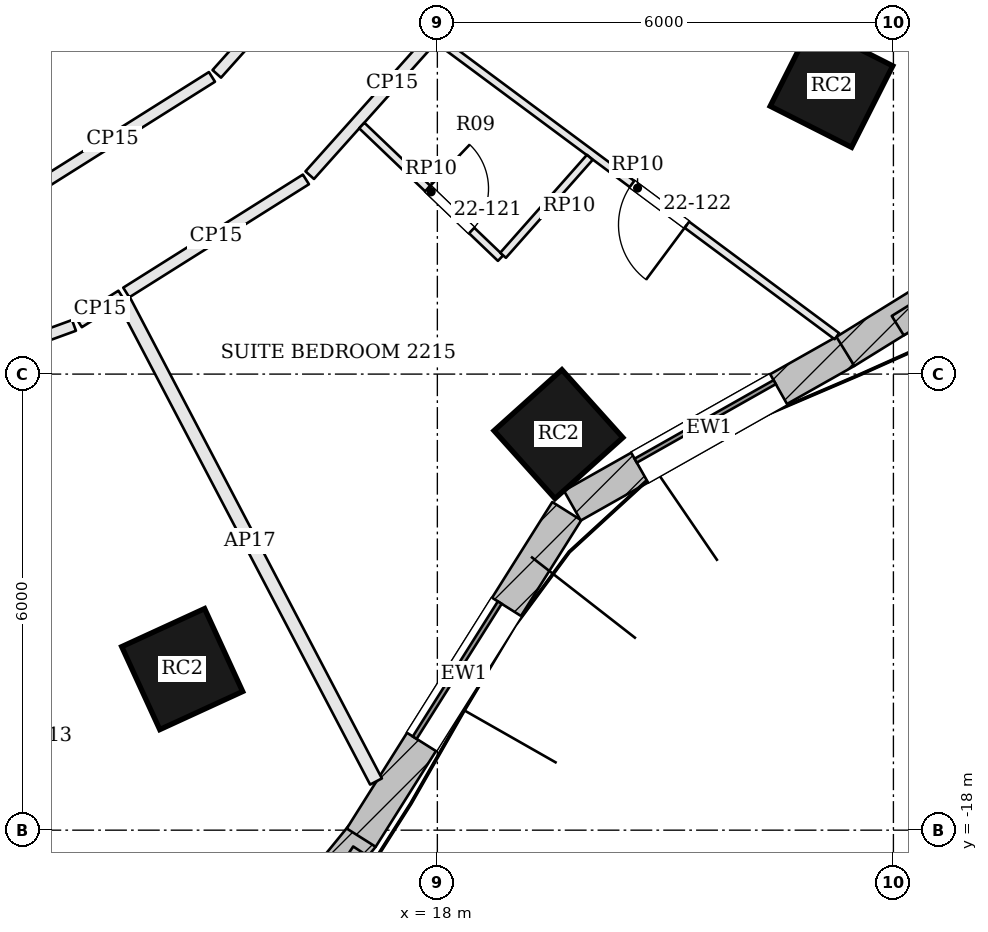
"""IFC4 building model, lengths in metres.
Left out: names, types, materials, properties, quantities, classifications, styles, units other than length and angle.
Written with IfcOpenShell. Run it as: python <this file> out.ifc"""

import sys

from ifc_helpers import new_model, si_unit, direction, frame, frame_2d, origin, origin_2d, place, context, subcontext, project, spatial, rectangle, extrude, element, fill, save


model = new_model("IFC4")
c1 = context("Model", 3, precision=1e-05, world=origin(), true_north=direction((0.0, 1.0)))
c2 = subcontext(c1, "Body", "Model", "MODEL_VIEW")
j1 = project(units=[si_unit("LENGTHUNIT", "METRE"), si_unit("PLANEANGLEUNIT", "RADIAN")], contexts=[c1])
p1 = place(None, origin())
s1 = spatial("IfcSite", under=j1, at=p1, CompositionType="ELEMENT")
p2 = place(p1, origin())
s2 = spatial("IfcBuilding", under=s1, at=p2, CompositionType="ELEMENT")
p3 = place(p2, frame((0.0, 0.0, 96.0)))
s3 = spatial("IfcBuildingStorey", under=s2, at=p3, CompositionType="ELEMENT", Elevation=96.0)
for number, where, z_axis, x_axis in (
    (1, (14.643, -15.881, 0.0), (0.0, 0.0, 1.0), (0.909, 0.417, 0.0)),
    (2, (19.593, -12.79, 0.0), (0.0, 0.0, 1.0), (0.744, 0.668, 0.0)),
    (3, (23.185, -8.21, 0.0), (0.0, 0.0, 1.0), (0.451, 0.893, 0.0)),
):
    element("IfcColumn", number, at=place(p3, frame(where, z_axis=z_axis, x_axis=x_axis)), inside=s3, PredefinedType="COLUMN", context=c2, shape_type="SweptSolid", body=[
        extrude(rectangle(XDim=1.2, YDim=1.2, at=origin_2d()), origin(), (0.0, 0.0, 1.0), 3.6),
    ])
p4 = place(p3, frame((14.926, -20.641, 0.0), z_axis=(0.0, 0.0, 1.0), x_axis=(0.631548074669, 0.775336720001, 0.0)))
e4 = element("IfcWall", 4, at=p4, inside=s3, PredefinedType="SOLIDWALL", context=c2, shape_type="SweptSolid", body=[
    extrude(rectangle(XDim=3.308, YDim=0.45, at=frame_2d((1.654, 0.0))), origin(), (0.0, 0.0, 1.0), 3.4),
])
p5 = place(p4, frame((0.604, 0.0, 0.9)))
e5 = element("IfcOpeningElement", 5, at=p5, cuts=e4, PredefinedType="OPENING", context=c2, shape_type="SweptSolid", body=[
    extrude(rectangle(XDim=2.1, YDim=2.0, at=frame_2d((1.05, 1.0))), frame((0.0, 0.235, 0.0), z_axis=(0.0, -1.0, 0.0), x_axis=(1.0, 0.0, 0.0)), (0.0, 0.0, 1.0), 0.47),
])
p6 = place(p3, frame((16.998, -18.099, 0.0), z_axis=(0.0, 0.0, 1.0), x_axis=(0.532745661304, 0.846275404559, 0.0)))
e6 = element("IfcWall", 6, at=p6, inside=s3, PredefinedType="SOLIDWALL", context=c2, shape_type="SweptSolid", body=[
    extrude(rectangle(XDim=5.076, YDim=0.45, at=frame_2d((2.538, 0.0))), origin(), (0.0, 0.0, 1.0), 3.4),
])
p7 = place(p6, frame((1.488, 0.0, 0.9)))
e7 = element("IfcOpeningElement", 7, at=p7, cuts=e6, PredefinedType="OPENING", context=c2, shape_type="SweptSolid", body=[
    extrude(rectangle(XDim=2.1, YDim=2.0, at=frame_2d((1.05, 1.0))), frame((0.0, 0.235, 0.0), z_axis=(0.0, -1.0, 0.0), x_axis=(1.0, 0.0, 0.0)), (0.0, 0.0, 1.0), 0.47),
])
p8 = place(p3, frame((19.776, -13.731, 0.0), z_axis=(0.0, 0.0, 1.0), x_axis=(0.870610133829, 0.491973571318, 0.0)))
e8 = element("IfcWall", 8, at=p8, inside=s3, PredefinedType="SOLIDWALL", context=c2, shape_type="SweptSolid", body=[
    extrude(rectangle(XDim=4.134, YDim=0.45, at=frame_2d((2.067, 0.0))), origin(), (0.0, 0.0, 1.0), 3.4),
])
p9 = place(p8, frame((1.017, 0.0, 0.9)))
e9 = element("IfcOpeningElement", 9, at=p9, cuts=e8, PredefinedType="OPENING", context=c2, shape_type="SweptSolid", body=[
    extrude(rectangle(XDim=2.1, YDim=2.0, at=frame_2d((1.05, 1.0))), frame((0.0, 0.235, 0.0), z_axis=(0.0, -1.0, 0.0), x_axis=(1.0, 0.0, 0.0)), (0.0, 0.0, 1.0), 0.47),
])
p10 = place(p3, frame((23.368, -11.701, 0.0), z_axis=(0.0, 0.0, 1.0), x_axis=(0.850251408633, 0.526376806211, 0.0)))
e10 = element("IfcWall", 10, at=p10, inside=s3, PredefinedType="SOLIDWALL", context=c2, shape_type="SweptSolid", body=[
    extrude(rectangle(XDim=5.302, YDim=0.45, at=frame_2d((2.651, 0.0))), origin(), (0.0, 0.0, 1.0), 3.4),
])
p11 = place(p10, frame((1.601, 0.0, 0.9)))
e11 = element("IfcOpeningElement", 11, at=p11, cuts=e10, PredefinedType="OPENING", context=c2, shape_type="SweptSolid", body=[
    extrude(rectangle(XDim=2.1, YDim=2.0, at=frame_2d((1.05, 1.0))), frame((0.0, 0.235, 0.0), z_axis=(0.0, -1.0, 0.0), x_axis=(1.0, 0.0, 0.0)), (0.0, 0.0, 1.0), 0.47),
])
p12 = place(p3, frame((16.838, -18.298, 0.0), z_axis=(0.0, 0.0, 1.0), x_axis=(0.835871900419, -0.548924554097, 0.0)))
e12 = element("IfcWall", 12, at=p12, inside=s3, PredefinedType="SOLIDWALL", context=c2, shape_type="SweptSolid", body=[
    extrude(rectangle(XDim=1.75, YDim=0.2, at=frame_2d((0.875, 0.0))), origin(), (0.0, 0.0, 1.0), 3.4),
])
p13 = place(p3, frame((24.057, -11.363, 3.6), z_axis=(0.0, 0.0, 1.0), x_axis=(0.85023666639, 0.526400618471, 0.0)))
e13 = element("IfcWall", 13, at=p13, inside=s3, PredefinedType="PARAPET", context=c2, shape_type="SweptSolid", body=[
    extrude(rectangle(XDim=4.385, YDim=0.3, at=frame_2d((2.192, 0.0))), origin(), (0.0, 0.0, 1.0), 1.1),
])
p14 = place(p3, frame((9.728, -12.631, 0.0), z_axis=(0.0, 0.0, 1.0), x_axis=(0.939626438181, 0.342201923826, 0.0)))
e14 = element("IfcWall", 14, at=p14, inside=s3, PredefinedType="PARTITIONING", context=c2, shape_type="SweptSolid", body=[
    extrude(rectangle(XDim=3.716, YDim=0.15, at=frame_2d((1.858, 0.0))), origin(), (0.0, 0.0, 1.0), 2.784),
])
p15 = place(p14, frame((0.45, 0.0, 0.0)))
e15 = element("IfcOpeningElement", 15, at=p15, cuts=e14, PredefinedType="OPENING", context=c2, shape_type="SweptSolid", body=[
    extrude(rectangle(XDim=1.0, YDim=2.1, at=frame_2d((0.5, 1.05))), frame((0.0, 0.085, 0.0), z_axis=(0.0, -1.0, 0.0), x_axis=(1.0, 0.0, 0.0)), (0.0, 0.0, 1.0), 0.17),
])
p16 = place(p3, frame((13.283, -11.319, 0.0), z_axis=(0.0, 0.0, 1.0), x_axis=(0.846275904875, 0.532744866543, 0.0)))
e16 = element("IfcWall", 16, at=p16, inside=s3, PredefinedType="PARTITIONING", context=c2, shape_type="SweptSolid", body=[
    extrude(rectangle(XDim=0.663, YDim=0.15, at=frame_2d((0.331, 0.0))), origin(), (0.0, 0.0, 1.0), 2.784),
])
p17 = place(p3, frame((17.193, -17.36, 0.0), z_axis=(0.0, 0.0, 1.0), x_axis=(-0.464005717448, 0.8858322043, 0.0)))
e17 = element("IfcWall", 17, at=p17, inside=s3, PredefinedType="PARTITIONING", context=c2, shape_type="SweptSolid", body=[
    extrude(rectangle(XDim=7.143, YDim=0.175, at=frame_2d((3.571, 0.0))), origin(), (0.0, 0.0, 1.0), 2.784),
])
p18 = place(p3, frame((13.907, -10.927, 0.0), z_axis=(0.0, 0.0, 1.0), x_axis=(0.846289768331, 0.53272284353, 0.0)))
e18 = element("IfcWall", 18, at=p18, inside=s3, PredefinedType="PARTITIONING", context=c2, shape_type="SweptSolid", body=[
    extrude(rectangle(XDim=2.793, YDim=0.15, at=frame_2d((1.396, 0.0))), origin(), (0.0, 0.0, 1.0), 2.784),
])
p19 = place(p3, frame((16.321, -9.383, 0.0), z_axis=(0.0, 0.0, 1.0), x_axis=(0.666834356165, 0.745205972492, 0.0)))
e19 = element("IfcWall", 19, at=p19, inside=s3, PredefinedType="PARTITIONING", context=c2, shape_type="SweptSolid", body=[
    extrude(rectangle(XDim=3.252, YDim=0.15, at=frame_2d((1.626, 0.0))), origin(), (0.0, 0.0, 1.0), 2.784),
])
p20 = place(p3, frame((16.925, -6.009, 0.0), z_axis=(0.0, 0.0, 1.0), x_axis=(-0.666893859891, -0.745152722359, 0.0)))
e20 = element("IfcWall", 20, at=p20, inside=s3, PredefinedType="PARTITIONING", context=c2, shape_type="SweptSolid", body=[
    extrude(rectangle(XDim=2.739, YDim=0.15, at=frame_2d((1.37, 0.0))), origin(), (0.0, 0.0, 1.0), 2.784),
])
p21 = place(p3, frame((15.034, -8.09, 0.0), z_axis=(0.0, 0.0, 1.0), x_axis=(-0.846322679414, -0.532670557014, 0.0)))
e21 = element("IfcWall", 21, at=p21, inside=s3, PredefinedType="PARTITIONING", context=c2, shape_type="SweptSolid", body=[
    extrude(rectangle(XDim=3.085, YDim=0.15, at=frame_2d((1.543, 0.0))), origin(), (0.0, 0.0, 1.0), 2.784),
])
p22 = place(p3, frame((23.256, -11.501, 0.0), z_axis=(0.0, 0.0, 1.0), x_axis=(-0.802700401869, 0.596382482003, 0.0)))
e22 = element("IfcWall", 22, at=p22, inside=s3, PredefinedType="PARTITIONING", context=c2, shape_type="SweptSolid", body=[
    extrude(rectangle(XDim=6.533, YDim=0.1, at=frame_2d((3.267, 0.0))), origin(), (0.0, 0.0, 1.0), 2.884),
])
p23 = place(p22, frame((2.458, 0.0, 0.0)))
e23 = element("IfcOpeningElement", 23, at=p23, cuts=e22, PredefinedType="OPENING", context=c2, shape_type="SweptSolid", body=[
    extrude(rectangle(XDim=0.9, YDim=2.4, at=frame_2d((0.45, 1.2))), frame((0.0, 0.06, 0.0), z_axis=(0.0, -1.0, 0.0), x_axis=(1.0, 0.0, 0.0)), (0.0, 0.0, 1.0), 0.12),
])
p24 = place(p3, frame((17.006, -8.73, 0.0), z_axis=(0.0, 0.0, 1.0), x_axis=(0.722927369978, -0.690924031813, 0.0)))
e24 = element("IfcWall", 24, at=p24, inside=s3, PredefinedType="PARTITIONING", context=c2, shape_type="SweptSolid", body=[
    extrude(rectangle(XDim=2.525, YDim=0.1, at=frame_2d((1.263, 0.0))), origin(), (0.0, 0.0, 1.0), 2.884),
])
p25 = place(p24, frame((1.2, 0.0, 0.0)))
e25 = element("IfcOpeningElement", 25, at=p25, cuts=e24, PredefinedType="OPENING", context=c2, shape_type="SweptSolid", body=[
    extrude(rectangle(XDim=0.8, YDim=2.1, at=frame_2d((0.4, 1.05))), frame((0.0, 0.06, 0.0), z_axis=(0.0, -1.0, 0.0), x_axis=(1.0, 0.0, 0.0)), (0.0, 0.0, 1.0), 0.12),
])
p26 = place(p3, frame((18.865, -10.437, 0.0), z_axis=(0.0, 0.0, 1.0), x_axis=(0.662901257744, 0.748706833468, 0.0)))
e26 = element("IfcWall", 26, at=p26, inside=s3, PredefinedType="PARTITIONING", context=c2, shape_type="SweptSolid", body=[
    extrude(rectangle(XDim=1.721, YDim=0.1, at=frame_2d((0.861, 0.0))), origin(), (0.0, 0.0, 1.0), 2.884),
])
p27 = place(p7, origin())
e27 = element("IfcWindow", 27, at=p27, inside=s3, PartitioningType="SINGLE_PANEL", PredefinedType="WINDOW", context=c2, shape_type="SweptSolid", body=[
    extrude(rectangle(XDim=2.1, YDim=2.0, at=frame_2d((1.05, 1.0))), frame((0.0, 0.135, 0.0), z_axis=(0.0, -1.0, 0.0), x_axis=(1.0, 0.0, 0.0)), (0.0, 0.0, 1.0), 0.06),
])
fill(e7, e27)
p28 = place(p9, origin())
e28 = element("IfcWindow", 28, at=p28, inside=s3, PartitioningType="SINGLE_PANEL", PredefinedType="WINDOW", context=c2, shape_type="SweptSolid", body=[
    extrude(rectangle(XDim=2.1, YDim=2.0, at=frame_2d((1.05, 1.0))), frame((0.0, 0.135, 0.0), z_axis=(0.0, -1.0, 0.0), x_axis=(1.0, 0.0, 0.0)), (0.0, 0.0, 1.0), 0.06),
])
fill(e9, e28)
p29 = place(p25, origin())
e29 = element("IfcDoor", 29, at=p29, inside=s3, OperationType="SINGLE_SWING_LEFT", PredefinedType="DOOR", context=c2, shape_type="SweptSolid", body=[
    extrude(rectangle(XDim=0.8, YDim=2.1, at=frame_2d((0.4, 1.05))), frame((0.0, 0.025, 0.0), z_axis=(0.0, -1.0, 0.0), x_axis=(1.0, 0.0, 0.0)), (0.0, 0.0, 1.0), 0.05),
])
fill(e25, e29)
p30 = place(p23, origin())
e30 = element("IfcDoor", 30, at=p30, inside=s3, OperationType="SINGLE_SWING_LEFT", PredefinedType="DOOR", context=c2, shape_type="SweptSolid", body=[
    extrude(rectangle(XDim=0.9, YDim=2.4, at=frame_2d((0.45, 1.2))), frame((0.0, 0.025, 0.0), z_axis=(0.0, -1.0, 0.0), x_axis=(1.0, 0.0, 0.0)), (0.0, 0.0, 1.0), 0.05),
])
fill(e23, e30)
save(model, sys.argv[1])
